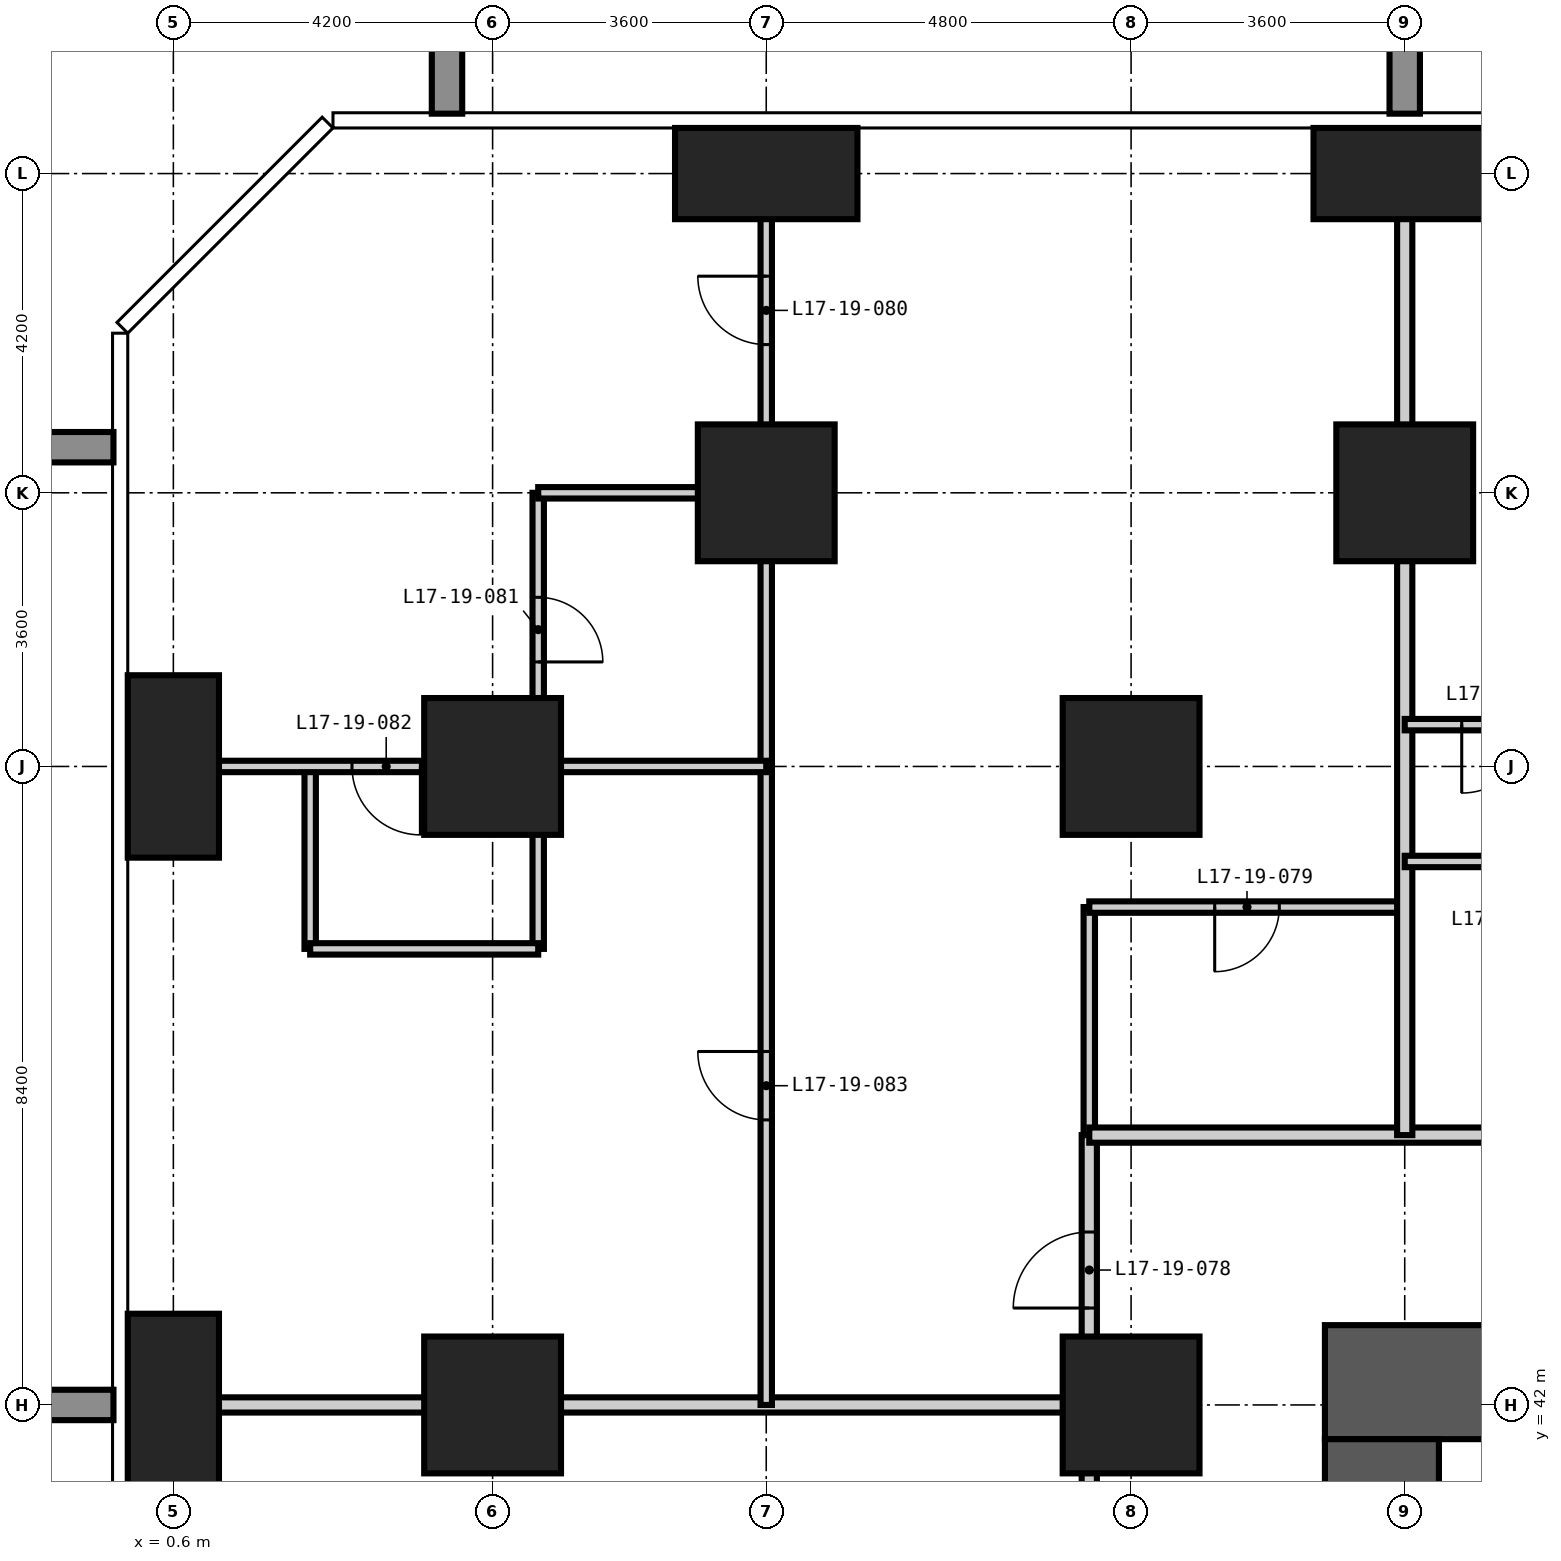
"""IFC4 building model, lengths in metres.
Left out: names, types, materials, properties, quantities, classifications, styles, units other than length and angle.
Written with IfcOpenShell. Run it as: python <this file> out.ifc"""

import sys

from ifc_helpers import new_model, si_unit, direction, frame, frame_2d, origin, origin_2d, place, context, subcontext, project, spatial, rectangle, extrude, element, fill, save


model = new_model("IFC4")
c1 = context("Model", 3, precision=1e-05, world=origin(), true_north=direction((0.0, 1.0)))
c2 = subcontext(c1, "Body", "Model", "MODEL_VIEW")
j1 = project(units=[si_unit("LENGTHUNIT", "METRE"), si_unit("PLANEANGLEUNIT", "RADIAN")], contexts=[c1])
p1 = place(None, origin())
s1 = spatial("IfcSite", under=j1, at=p1, CompositionType="ELEMENT")
p2 = place(p1, origin())
s2 = spatial("IfcBuilding", under=s1, at=p2, CompositionType="ELEMENT")
p3 = place(p2, frame((0.0, 0.0, 70.2)))
s3 = spatial("IfcBuildingStorey", under=s2, at=p3, CompositionType="ELEMENT", Elevation=70.2)
for number, where, z_axis, x_axis in (
    (1, (0.6, 42.0, -0.35), (0.0, 0.0, 1.0), (1.0, 0.0, 0.0)),
    (2, (0.6, 50.4, -0.35), (0.0, 0.0, 1.0), (1.0, 0.0, 0.0)),
):
    element("IfcColumn", number, at=place(p3, frame(where, z_axis=z_axis, x_axis=x_axis)), inside=s3, PredefinedType="COLUMN", context=c2, shape_type="SweptSolid", body=[
        extrude(rectangle(XDim=1.2, YDim=2.4, at=origin_2d()), origin(), (0.0, 0.0, 1.0), 3.6),
    ])
for number, where, z_axis, x_axis in (
    (3, (4.8, 42.0, -0.35), (0.0, 0.0, 1.0), (1.0, 0.0, 0.0)),
    (4, (4.8, 50.4, -0.35), (0.0, 0.0, 1.0), (1.0, 0.0, 0.0)),
    (5, (8.4, 54.0, -0.35), (0.0, 0.0, 1.0), (1.0, 0.0, 0.0)),
):
    element("IfcColumn", number, at=place(p3, frame(where, z_axis=z_axis, x_axis=x_axis)), inside=s3, PredefinedType="COLUMN", context=c2, shape_type="SweptSolid", body=[
        extrude(rectangle(XDim=1.8, YDim=1.8, at=origin_2d()), origin(), (0.0, 0.0, 1.0), 3.6),
    ])
p4 = place(p3, frame((8.4, 58.2, -0.35), z_axis=(0.0, 0.0, 1.0), x_axis=(1.0, 0.0, 0.0)))
e6 = element("IfcColumn", 6, at=p4, inside=s3, PredefinedType="COLUMN", context=c2, shape_type="SweptSolid", body=[
    extrude(rectangle(XDim=2.4, YDim=1.2, at=origin_2d()), origin(), (0.0, 0.0, 1.0), 3.6),
])
for number, where, z_axis, x_axis in (
    (7, (13.2, 42.0, -0.35), (0.0, 0.0, 1.0), (1.0, 0.0, 0.0)),
    (8, (13.2, 50.4, -0.35), (0.0, 0.0, 1.0), (1.0, 0.0, 0.0)),
    (9, (16.8, 54.0, -0.35), (0.0, 0.0, 1.0), (1.0, 0.0, 0.0)),
):
    element("IfcColumn", number, at=place(p3, frame(where, z_axis=z_axis, x_axis=x_axis)), inside=s3, PredefinedType="COLUMN", context=c2, shape_type="SweptSolid", body=[
        extrude(rectangle(XDim=1.8, YDim=1.8, at=origin_2d()), origin(), (0.0, 0.0, 1.0), 3.6),
    ])
p5 = place(p3, frame((16.8, 58.2, -0.35), z_axis=(0.0, 0.0, 1.0), x_axis=(1.0, 0.0, 0.0)))
e10 = element("IfcColumn", 10, at=p5, inside=s3, PredefinedType="COLUMN", context=c2, shape_type="SweptSolid", body=[
    extrude(rectangle(XDim=2.4, YDim=1.2, at=origin_2d()), origin(), (0.0, 0.0, 1.0), 3.6),
])
p6 = place(p3, frame((43.05, 42.3, -0.35), z_axis=(0.0, 0.0, 1.0), x_axis=(-1.0, 0.0, 0.0)))
e11 = element("IfcWall", 11, at=p6, inside=s3, PredefinedType="SHEAR", context=c2, shape_type="SweptSolid", body=[
    extrude(rectangle(XDim=27.3, YDim=1.5, at=frame_2d((13.65, 0.0))), origin(), (0.0, 0.0, 1.0), 3.6),
])
p7 = place(p6, frame((21.55, 0.0, 0.35)))
e12 = element("IfcOpeningElement", 12, at=p7, cuts=e11, PredefinedType="OPENING", context=c2, shape_type="SweptSolid", body=[
    extrude(rectangle(XDim=1.0, YDim=2.1, at=frame_2d((0.5, 1.05))), frame((0.0, 0.76, 0.0), z_axis=(0.0, -1.0, 0.0), x_axis=(1.0, 0.0, 0.0)), (0.0, 0.0, 1.0), 1.52),
])
p8 = place(p6, frame((10.95, 0.0, 0.35)))
e13 = element("IfcOpeningElement", 13, at=p8, cuts=e11, PredefinedType="OPENING", context=c2, shape_type="SweptSolid", body=[
    extrude(rectangle(XDim=1.2, YDim=2.2, at=frame_2d((0.6, 1.1))), frame((0.0, 0.76, 0.0), z_axis=(0.0, -1.0, 0.0), x_axis=(1.0, 0.0, 0.0)), (0.0, 0.0, 1.0), 1.52),
])
p9 = place(p3, frame((16.5, 41.55, -0.35), z_axis=(0.0, 0.0, 1.0), x_axis=(0.0, -1.0, 0.0)))
e14 = element("IfcWall", 14, at=p9, inside=s3, PredefinedType="SHEAR", context=c2, shape_type="SweptSolid", body=[
    extrude(rectangle(XDim=24.3, YDim=1.5, at=frame_2d((12.15, 0.0))), origin(), (0.0, 0.0, 1.0), 3.6),
])
p10 = place(p9, frame((11.25, 0.0, 0.35)))
e15 = element("IfcOpeningElement", 15, at=p10, cuts=e14, PredefinedType="OPENING", context=c2, shape_type="SweptSolid", body=[
    extrude(rectangle(XDim=1.8, YDim=2.2, at=frame_2d((0.9, 1.1))), frame((0.0, 0.76, 0.0), z_axis=(0.0, -1.0, 0.0), x_axis=(1.0, 0.0, 0.0)), (0.0, 0.0, 1.0), 1.52),
])
p11 = place(p9, frame((20.05, 0.0, 0.35)))
e16 = element("IfcOpeningElement", 16, at=p11, cuts=e14, PredefinedType="OPENING", context=c2, shape_type="SweptSolid", body=[
    extrude(rectangle(XDim=1.0, YDim=2.1, at=frame_2d((0.5, 1.05))), frame((0.0, 0.76, 0.0), z_axis=(0.0, -1.0, 0.0), x_axis=(1.0, 0.0, 0.0)), (0.0, 0.0, 1.0), 1.52),
])
p12 = place(p9, frame((5.35, 0.0, 0.35)))
e17 = element("IfcOpeningElement", 17, at=p12, cuts=e14, PredefinedType="OPENING", context=c2, shape_type="SweptSolid", body=[
    extrude(rectangle(XDim=1.0, YDim=2.1, at=frame_2d((0.5, 1.05))), frame((0.0, 0.76, 0.0), z_axis=(0.0, -1.0, 0.0), x_axis=(1.0, 0.0, 0.0)), (0.0, 0.0, 1.0), 1.52),
])
p13 = place(p3, frame((5.4, 50.4, 0.0), z_axis=(0.0, 0.0, 1.0), x_axis=(0.0, 1.0, 0.0)))
e18 = element("IfcWall", 18, at=p13, inside=s3, PredefinedType="PARTITIONING", context=c2, shape_type="SweptSolid", body=[
    extrude(rectangle(XDim=3.6, YDim=0.15, at=frame_2d((1.8, 0.0))), origin(), (0.0, 0.0, 1.0), 3.25),
])
p14 = place(p13, frame((1.375, 0.0, 0.0)))
e19 = element("IfcOpeningElement", 19, at=p14, cuts=e18, PredefinedType="OPENING", context=c2, shape_type="SweptSolid", body=[
    extrude(rectangle(XDim=0.85, YDim=2.1, at=frame_2d((0.425, 1.05))), frame((0.0, 0.085, 0.0), z_axis=(0.0, -1.0, 0.0), x_axis=(1.0, 0.0, 0.0)), (0.0, 0.0, 1.0), 0.17),
])
p15 = place(p3, frame((12.65, 45.55, 0.0), z_axis=(0.0, 0.0, 1.0), x_axis=(0.0, 1.0, 0.0)))
e20 = element("IfcWall", 20, at=p15, inside=s3, PredefinedType="PARTITIONING", context=c2, shape_type="SweptSolid", body=[
    extrude(rectangle(XDim=3.0, YDim=0.15, at=frame_2d((1.5, 0.0))), origin(), (0.0, 0.0, 1.0), 3.25),
])
p16 = place(p3, frame((12.65, 48.55, 0.0), z_axis=(0.0, 0.0, 1.0), x_axis=(1.0, 0.0, 0.0)))
e21 = element("IfcWall", 21, at=p16, inside=s3, PredefinedType="PARTITIONING", context=c2, shape_type="SweptSolid", body=[
    extrude(rectangle(XDim=4.15, YDim=0.15, at=frame_2d((2.075, 0.0))), origin(), (0.0, 0.0, 1.0), 3.25),
])
p17 = place(p16, frame((1.65, 0.0, 0.0)))
e22 = element("IfcOpeningElement", 22, at=p17, cuts=e21, PredefinedType="OPENING", context=c2, shape_type="SweptSolid", body=[
    extrude(rectangle(XDim=0.85, YDim=2.1, at=frame_2d((0.425, 1.05))), frame((0.0, 0.085, 0.0), z_axis=(0.0, -1.0, 0.0), x_axis=(1.0, 0.0, 0.0)), (0.0, 0.0, 1.0), 0.17),
])
p18 = place(p3, frame((5.4, 54.0, 0.0), z_axis=(0.0, 0.0, 1.0), x_axis=(1.0, 0.0, 0.0)))
e23 = element("IfcWall", 23, at=p18, inside=s3, PredefinedType="PARTITIONING", context=c2, shape_type="SweptSolid", body=[
    extrude(rectangle(XDim=3.0, YDim=0.15, at=frame_2d((1.5, 0.0))), origin(), (0.0, 0.0, 1.0), 3.25),
])
p19 = place(p3, frame((12.65, 12.65, 0.0), z_axis=(0.0, 0.0, 1.0), x_axis=(0.0, 1.0, 0.0)))
e24 = element("IfcWall", 24, at=p19, inside=s3, PredefinedType="PARTITIONING", context=c2, shape_type="SweptSolid", body=[
    extrude(rectangle(XDim=32.9, YDim=0.2, at=frame_2d((16.45, 0.0))), origin(), (0.0, 0.0, 1.0), 3.25),
])
p20 = place(p19, frame((9.05, 0.0, 0.0)))
e25 = element("IfcOpeningElement", 25, at=p20, cuts=e24, PredefinedType="OPENING", context=c2, shape_type="SweptSolid", body=[
    extrude(rectangle(XDim=1.0, YDim=2.2, at=frame_2d((0.5, 1.1))), frame((0.0, 0.11, 0.0), z_axis=(0.0, -1.0, 0.0), x_axis=(1.0, 0.0, 0.0)), (0.0, 0.0, 1.0), 0.22),
])
p21 = place(p19, frame((15.05, 0.0, 0.0)))
e26 = element("IfcOpeningElement", 26, at=p21, cuts=e24, PredefinedType="OPENING", context=c2, shape_type="SweptSolid", body=[
    extrude(rectangle(XDim=1.0, YDim=2.2, at=frame_2d((0.5, 1.1))), frame((0.0, 0.11, 0.0), z_axis=(0.0, -1.0, 0.0), x_axis=(1.0, 0.0, 0.0)), (0.0, 0.0, 1.0), 0.22),
])
p22 = place(p19, frame((25.85, 0.0, 0.0)))
e27 = element("IfcOpeningElement", 27, at=p22, cuts=e24, PredefinedType="OPENING", context=c2, shape_type="SweptSolid", body=[
    extrude(rectangle(XDim=1.0, YDim=2.2, at=frame_2d((0.5, 1.1))), frame((0.0, 0.11, 0.0), z_axis=(0.0, -1.0, 0.0), x_axis=(1.0, 0.0, 0.0)), (0.0, 0.0, 1.0), 0.22),
])
p23 = place(p19, frame((1.575, 0.0, 0.0)))
e28 = element("IfcOpeningElement", 28, at=p23, cuts=e24, PredefinedType="OPENING", context=c2, shape_type="SweptSolid", body=[
    extrude(rectangle(XDim=1.0, YDim=2.2, at=frame_2d((0.5, 1.1))), frame((0.0, 0.11, 0.0), z_axis=(0.0, -1.0, 0.0), x_axis=(1.0, 0.0, 0.0)), (0.0, 0.0, 1.0), 0.22),
])
p24 = place(p19, frame((30.625, 0.0, 0.0)))
e29 = element("IfcOpeningElement", 29, at=p24, cuts=e24, PredefinedType="OPENING", context=c2, shape_type="SweptSolid", body=[
    extrude(rectangle(XDim=1.0, YDim=2.2, at=frame_2d((0.5, 1.1))), frame((0.0, 0.11, 0.0), z_axis=(0.0, -1.0, 0.0), x_axis=(1.0, 0.0, 0.0)), (0.0, 0.0, 1.0), 0.22),
])
p25 = place(p3, frame((12.65, 45.55, 0.0), z_axis=(0.0, 0.0, 1.0), x_axis=(1.0, 0.0, 0.0)))
e30 = element("IfcWall", 30, at=p25, inside=s3, PredefinedType="PARTITIONING", context=c2, shape_type="SweptSolid", body=[
    extrude(rectangle(XDim=32.3, YDim=0.2, at=frame_2d((16.15, 0.0))), origin(), (0.0, 0.0, 1.0), 3.25),
])
p26 = place(p25, frame((6.95, 0.0, 0.0)))
e31 = element("IfcOpeningElement", 31, at=p26, cuts=e30, PredefinedType="OPENING", context=c2, shape_type="SweptSolid", body=[
    extrude(rectangle(XDim=1.0, YDim=2.2, at=frame_2d((0.5, 1.1))), frame((0.0, 0.11, 0.0), z_axis=(0.0, -1.0, 0.0), x_axis=(1.0, 0.0, 0.0)), (0.0, 0.0, 1.0), 0.22),
])
p27 = place(p25, frame((10.85, 0.0, 0.0)))
e32 = element("IfcOpeningElement", 32, at=p27, cuts=e30, PredefinedType="OPENING", context=c2, shape_type="SweptSolid", body=[
    extrude(rectangle(XDim=1.0, YDim=2.2, at=frame_2d((0.5, 1.1))), frame((0.0, 0.11, 0.0), z_axis=(0.0, -1.0, 0.0), x_axis=(1.0, 0.0, 0.0)), (0.0, 0.0, 1.0), 0.22),
])
p28 = place(p25, frame((21.65, 0.0, 0.0)))
e33 = element("IfcOpeningElement", 33, at=p28, cuts=e30, PredefinedType="OPENING", context=c2, shape_type="SweptSolid", body=[
    extrude(rectangle(XDim=1.0, YDim=2.2, at=frame_2d((0.5, 1.1))), frame((0.0, 0.11, 0.0), z_axis=(0.0, -1.0, 0.0), x_axis=(1.0, 0.0, 0.0)), (0.0, 0.0, 1.0), 0.22),
])
p29 = place(p25, frame((25.55, 0.0, 0.0)))
e34 = element("IfcOpeningElement", 34, at=p29, cuts=e30, PredefinedType="OPENING", context=c2, shape_type="SweptSolid", body=[
    extrude(rectangle(XDim=1.0, YDim=2.2, at=frame_2d((0.5, 1.1))), frame((0.0, 0.11, 0.0), z_axis=(0.0, -1.0, 0.0), x_axis=(1.0, 0.0, 0.0)), (0.0, 0.0, 1.0), 0.22),
])
p30 = place(p3, frame((16.8, 45.55, 0.0), z_axis=(0.0, 0.0, 1.0), x_axis=(0.0, 1.0, 0.0)))
e35 = element("IfcWall", 35, at=p30, inside=s3, PredefinedType="PARTITIONING", context=c2, shape_type="SweptSolid", body=[
    extrude(rectangle(XDim=13.258, YDim=0.2, at=frame_2d((6.629, 0.0))), origin(), (0.0, 0.0, 1.0), 3.25),
])
p31 = place(p3, frame((-0.008, 42.0, 0.0), z_axis=(0.0, 0.0, 1.0), x_axis=(1.0, 0.0, 0.0)))
e36 = element("IfcWall", 36, at=p31, inside=s3, PredefinedType="PARTITIONING", context=c2, shape_type="SweptSolid", body=[
    extrude(rectangle(XDim=12.658, YDim=0.2, at=frame_2d((6.329, 0.0))), origin(), (0.0, 0.0, 1.0), 3.25),
])
for number, where, z_axis, x_axis in (
    (37, (2.4, 48.0, 0.0), (0.0, 0.0, 1.0), (0.0, 1.0, 0.0)),
    (38, (5.4, 48.0, 0.0), (0.0, 0.0, 1.0), (0.0, 1.0, 0.0)),
):
    element("IfcWall", number, at=place(p3, frame(where, z_axis=z_axis, x_axis=x_axis)), inside=s3, PredefinedType="PARTITIONING", context=c2, shape_type="SweptSolid", body=[
        extrude(rectangle(XDim=2.4, YDim=0.15, at=frame_2d((1.2, 0.0))), origin(), (0.0, 0.0, 1.0), 3.25),
    ])
p32 = place(p3, frame((8.4, 42.0, 0.0), z_axis=(0.0, 0.0, 1.0), x_axis=(0.0, 1.0, 0.0)))
e39 = element("IfcWall", 39, at=p32, inside=s3, PredefinedType="PARTITIONING", context=c2, shape_type="SweptSolid", body=[
    extrude(rectangle(XDim=16.808, YDim=0.15, at=frame_2d((8.404, 0.0))), origin(), (0.0, 0.0, 1.0), 3.25),
])
p33 = place(p32, frame((13.95, 0.0, 0.0)))
e40 = element("IfcOpeningElement", 40, at=p33, cuts=e39, PredefinedType="OPENING", context=c2, shape_type="SweptSolid", body=[
    extrude(rectangle(XDim=0.9, YDim=2.1, at=frame_2d((0.45, 1.05))), frame((0.0, 0.085, 0.0), z_axis=(0.0, -1.0, 0.0), x_axis=(1.0, 0.0, 0.0)), (0.0, 0.0, 1.0), 0.17),
])
p34 = place(p32, frame((3.75, 0.0, 0.0)))
e41 = element("IfcOpeningElement", 41, at=p34, cuts=e39, PredefinedType="OPENING", context=c2, shape_type="SweptSolid", body=[
    extrude(rectangle(XDim=0.9, YDim=2.1, at=frame_2d((0.45, 1.05))), frame((0.0, 0.085, 0.0), z_axis=(0.0, -1.0, 0.0), x_axis=(1.0, 0.0, 0.0)), (0.0, 0.0, 1.0), 0.17),
])
p35 = place(p3, frame((2.4, 48.0, 0.0), z_axis=(0.0, 0.0, 1.0), x_axis=(1.0, 0.0, 0.0)))
e42 = element("IfcWall", 42, at=p35, inside=s3, PredefinedType="PARTITIONING", context=c2, shape_type="SweptSolid", body=[
    extrude(rectangle(XDim=3.0, YDim=0.15, at=frame_2d((1.5, 0.0))), origin(), (0.0, 0.0, 1.0), 3.25),
])
p36 = place(p3, frame((16.8, 49.15, 0.0), z_axis=(0.0, 0.0, 1.0), x_axis=(1.0, 0.0, 0.0)))
e43 = element("IfcWall", 43, at=p36, inside=s3, PredefinedType="PARTITIONING", context=c2, shape_type="SweptSolid", body=[
    extrude(rectangle(XDim=2.4, YDim=0.15, at=frame_2d((1.2, 0.0))), origin(), (0.0, 0.0, 1.0), 3.25),
])
p37 = place(p3, frame((-0.008, 50.4, 0.0), z_axis=(0.0, 0.0, 1.0), x_axis=(1.0, 0.0, 0.0)))
e44 = element("IfcWall", 44, at=p37, inside=s3, PredefinedType="PARTITIONING", context=c2, shape_type="SweptSolid", body=[
    extrude(rectangle(XDim=8.408, YDim=0.15, at=frame_2d((4.204, 0.0))), origin(), (0.0, 0.0, 1.0), 3.25),
])
p38 = place(p37, frame((2.958, 0.0, 0.0)))
e45 = element("IfcOpeningElement", 45, at=p38, cuts=e44, PredefinedType="OPENING", context=c2, shape_type="SweptSolid", body=[
    extrude(rectangle(XDim=0.9, YDim=2.1, at=frame_2d((0.45, 1.05))), frame((0.0, 0.085, 0.0), z_axis=(0.0, -1.0, 0.0), x_axis=(1.0, 0.0, 0.0)), (0.0, 0.0, 1.0), 0.17),
])
p39 = place(p3, frame((16.8, 50.95, 0.0), z_axis=(0.0, 0.0, 1.0), x_axis=(1.0, 0.0, 0.0)))
e46 = element("IfcWall", 46, at=p39, inside=s3, PredefinedType="PARTITIONING", context=c2, shape_type="SweptSolid", body=[
    extrude(rectangle(XDim=2.4, YDim=0.15, at=frame_2d((1.2, 0.0))), origin(), (0.0, 0.0, 1.0), 3.25),
])
p40 = place(p39, frame((0.75, 0.0, 0.0)))
e47 = element("IfcOpeningElement", 47, at=p40, cuts=e46, PredefinedType="OPENING", context=c2, shape_type="SweptSolid", body=[
    extrude(rectangle(XDim=0.9, YDim=2.1, at=frame_2d((0.45, 1.05))), frame((0.0, 0.085, 0.0), z_axis=(0.0, -1.0, 0.0), x_axis=(1.0, 0.0, 0.0)), (0.0, 0.0, 1.0), 0.17),
])
p41 = place(p40, frame((0.9, 0.0, 0.0), z_axis=(0.0, 0.0, 1.0), x_axis=(-1.0, 0.0, 0.0)))
e48 = element("IfcDoor", 48, at=p41, inside=s3, OperationType="SINGLE_SWING_RIGHT", PredefinedType="DOOR", context=c2, shape_type="SweptSolid", body=[
    extrude(rectangle(XDim=0.9, YDim=2.1, at=frame_2d((0.45, 1.05))), frame((0.0, 0.025, 0.0), z_axis=(0.0, -1.0, 0.0), x_axis=(1.0, 0.0, 0.0)), (0.0, 0.0, 1.0), 0.05),
])
fill(e47, e48)
p42 = place(p24, origin())
e49 = element("IfcDoor", 49, at=p42, inside=s3, OperationType="SINGLE_SWING_LEFT", PredefinedType="DOOR", context=c2, shape_type="SweptSolid", body=[
    extrude(rectangle(XDim=1.0, YDim=2.2, at=frame_2d((0.5, 1.1))), frame((0.0, 0.025, 0.0), z_axis=(0.0, -1.0, 0.0), x_axis=(1.0, 0.0, 0.0)), (0.0, 0.0, 1.0), 0.05),
])
fill(e29, e49)
p43 = place(p17, frame((0.85, 0.0, 0.0), z_axis=(0.0, 0.0, 1.0), x_axis=(-1.0, 0.0, 0.0)))
e50 = element("IfcDoor", 50, at=p43, inside=s3, OperationType="SINGLE_SWING_RIGHT", PredefinedType="DOOR", context=c2, shape_type="SweptSolid", body=[
    extrude(rectangle(XDim=0.85, YDim=2.1, at=frame_2d((0.425, 1.05))), frame((0.0, 0.025, 0.0), z_axis=(0.0, -1.0, 0.0), x_axis=(1.0, 0.0, 0.0)), (0.0, 0.0, 1.0), 0.05),
])
fill(e22, e50)
p44 = place(p33, origin())
e51 = element("IfcDoor", 51, at=p44, inside=s3, OperationType="SINGLE_SWING_RIGHT", PredefinedType="DOOR", context=c2, shape_type="SweptSolid", body=[
    extrude(rectangle(XDim=0.9, YDim=2.1, at=frame_2d((0.45, 1.05))), frame((0.0, 0.025, 0.0), z_axis=(0.0, -1.0, 0.0), x_axis=(1.0, 0.0, 0.0)), (0.0, 0.0, 1.0), 0.05),
])
fill(e40, e51)
p45 = place(p14, frame((0.85, 0.0, 0.0), z_axis=(0.0, 0.0, 1.0), x_axis=(-1.0, 0.0, 0.0)))
e52 = element("IfcDoor", 52, at=p45, inside=s3, OperationType="SINGLE_SWING_RIGHT", PredefinedType="DOOR", context=c2, shape_type="SweptSolid", body=[
    extrude(rectangle(XDim=0.85, YDim=2.1, at=frame_2d((0.425, 1.05))), frame((0.0, 0.025, 0.0), z_axis=(0.0, -1.0, 0.0), x_axis=(1.0, 0.0, 0.0)), (0.0, 0.0, 1.0), 0.05),
])
fill(e19, e52)
p46 = place(p38, frame((0.9, 0.0, 0.0), z_axis=(0.0, 0.0, 1.0), x_axis=(-1.0, 0.0, 0.0)))
e53 = element("IfcDoor", 53, at=p46, inside=s3, OperationType="SINGLE_SWING_LEFT", PredefinedType="DOOR", context=c2, shape_type="SweptSolid", body=[
    extrude(rectangle(XDim=0.9, YDim=2.1, at=frame_2d((0.45, 1.05))), frame((0.0, 0.025, 0.0), z_axis=(0.0, -1.0, 0.0), x_axis=(1.0, 0.0, 0.0)), (0.0, 0.0, 1.0), 0.05),
])
fill(e45, e53)
p47 = place(p34, origin())
e54 = element("IfcDoor", 54, at=p47, inside=s3, OperationType="SINGLE_SWING_RIGHT", PredefinedType="DOOR", context=c2, shape_type="SweptSolid", body=[
    extrude(rectangle(XDim=0.9, YDim=2.1, at=frame_2d((0.45, 1.05))), frame((0.0, 0.025, 0.0), z_axis=(0.0, -1.0, 0.0), x_axis=(1.0, 0.0, 0.0)), (0.0, 0.0, 1.0), 0.05),
])
fill(e41, e54)
save(model, sys.argv[1])
